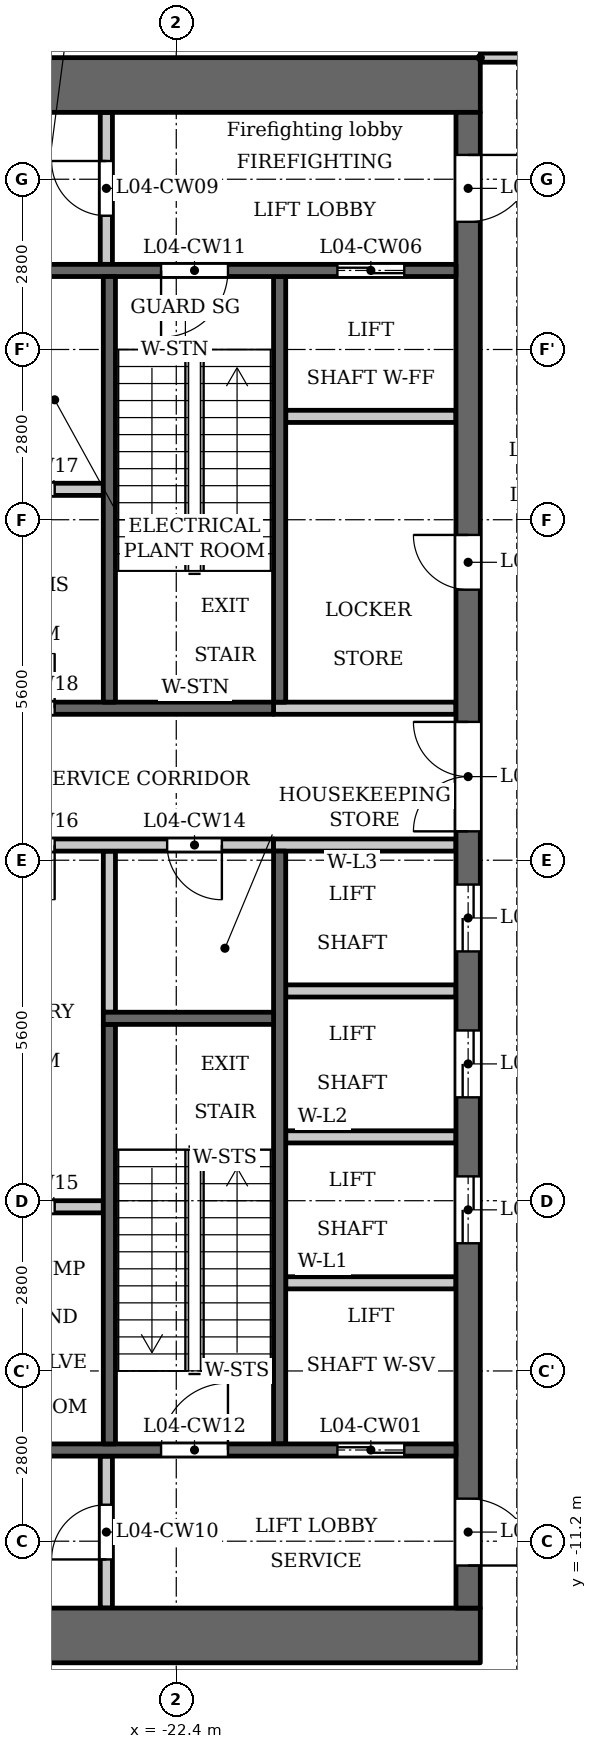
"""IFC4 building model, lengths in metres.
Left out: names, types, materials, properties, quantities, classifications, styles, units other than length and angle.
Written with IfcOpenShell. Run it as: python <this file> out.ifc"""

import sys

from ifc_helpers import new_model, si_unit, direction, frame, frame_2d, origin, place, context, subcontext, project, spatial, rectangle, extrude, element, fill, save


model = new_model("IFC4")
c1 = context("Model", 3, precision=1e-05, world=origin(), true_north=direction((0.0, 1.0)))
c2 = subcontext(c1, "Body", "Model", "MODEL_VIEW")
j1 = project(units=[si_unit("LENGTHUNIT", "METRE"), si_unit("PLANEANGLEUNIT", "RADIAN")], contexts=[c1])
p1 = place(None, origin())
s1 = spatial("IfcSite", under=j1, at=p1, CompositionType="ELEMENT")
p2 = place(p1, origin())
s2 = spatial("IfcBuilding", under=s1, at=p2, CompositionType="ELEMENT")
p3 = place(p2, frame((0.0, 0.0, 20.9)))
s3 = spatial("IfcBuildingStorey", under=s2, at=p3, CompositionType="ELEMENT", Elevation=20.9)
p4 = place(p3, frame((-23.5, -2.5, 0.0), z_axis=(0.0, 0.0, 1.0), x_axis=(0.0, 1.0, 0.0)))
e1 = element("IfcWall", 1, at=p4, inside=s3, PredefinedType="PARTITIONING", context=c2, shape_type="SweptSolid", body=[
    extrude(rectangle(XDim=2.65, YDim=0.2, at=frame_2d((1.325, 0.0))), origin(), (0.0, 0.0, 1.0), 4.45),
])
p5 = place(p3, frame((-20.7, 2.6, 0.0), z_axis=(0.0, 0.0, 1.0), x_axis=(0.0, 1.0, 0.0)))
e2 = element("IfcWall", 2, at=p5, inside=s3, PredefinedType="SHEAR", context=c2, shape_type="SweptSolid", body=[
    extrude(rectangle(XDim=7.0, YDim=0.2, at=frame_2d((3.5, 0.0))), origin(), (0.0, 0.0, 1.0), 4.45),
])
p6 = place(p3, frame((-20.7, -9.6, 0.0), z_axis=(0.0, 0.0, 1.0), x_axis=(0.0, 1.0, 0.0)))
e3 = element("IfcWall", 3, at=p6, inside=s3, PredefinedType="SHEAR", context=c2, shape_type="SweptSolid", body=[
    extrude(rectangle(XDim=9.75, YDim=0.2, at=frame_2d((4.875, 0.0))), origin(), (0.0, 0.0, 1.0), 4.45),
])
p7 = place(p3, frame((-20.8, 2.5, 0.0), z_axis=(0.0, 0.0, 1.0), x_axis=(-1.0, 0.0, 0.0)))
e4 = element("IfcWall", 4, at=p7, inside=s3, PredefinedType="SHEAR", context=c2, shape_type="SweptSolid", body=[
    extrude(rectangle(XDim=5.3, YDim=0.2, at=frame_2d((2.65, 0.0))), origin(), (0.0, 0.0, 1.0), 4.45),
])
p8 = place(p7, frame((3.6, 0.0, 0.0)))
e5 = element("IfcOpeningElement", 5, at=p8, cuts=e4, PredefinedType="OPENING", context=c2, shape_type="SweptSolid", body=[
    extrude(rectangle(XDim=0.9, YDim=2.1, at=frame_2d((0.45, 1.05))), frame((0.0, 0.11, 0.0), z_axis=(0.0, -1.0, 0.0), x_axis=(1.0, 0.0, 0.0)), (0.0, 0.0, 1.0), 0.22),
])
p9 = place(p3, frame((-20.8, 0.25, 0.0), z_axis=(0.0, 0.0, 1.0), x_axis=(-1.0, 0.0, 0.0)))
e6 = element("IfcWall", 6, at=p9, inside=s3, PredefinedType="PARTITIONING", context=c2, shape_type="SweptSolid", body=[
    extrude(rectangle(XDim=5.3, YDim=0.2, at=frame_2d((2.65, 0.0))), origin(), (0.0, 0.0, 1.0), 4.45),
])
p10 = place(p9, frame((0.85, 0.0, 0.0)))
e7 = element("IfcOpeningElement", 7, at=p10, cuts=e6, PredefinedType="OPENING", context=c2, shape_type="SweptSolid", body=[
    extrude(rectangle(XDim=0.9, YDim=2.1, at=frame_2d((0.45, 1.05))), frame((0.0, 0.11, 0.0), z_axis=(0.0, -1.0, 0.0), x_axis=(1.0, 0.0, 0.0)), (0.0, 0.0, 1.0), 0.22),
])
p11 = place(p9, frame((3.6, 0.0, 0.0)))
e8 = element("IfcOpeningElement", 8, at=p11, cuts=e6, PredefinedType="OPENING", context=c2, shape_type="SweptSolid", body=[
    extrude(rectangle(XDim=0.9, YDim=2.1, at=frame_2d((0.45, 1.05))), frame((0.0, 0.11, 0.0), z_axis=(0.0, -1.0, 0.0), x_axis=(1.0, 0.0, 0.0)), (0.0, 0.0, 1.0), 0.22),
])
for number, where, z_axis, x_axis in (
    (9, (-17.4, 12.75, 0.0), (0.0, 0.0, 1.0), (-1.0, 0.0, 0.0)),
    (10, (-17.4, -12.75, 0.0), (0.0, 0.0, 1.0), (-1.0, 0.0, 0.0)),
):
    element("IfcWall", number, at=place(p3, frame(where, z_axis=z_axis, x_axis=x_axis)), inside=s3, PredefinedType="SHEAR", context=c2, shape_type="SweptSolid", body=[
        extrude(rectangle(XDim=10.4, YDim=0.9, at=frame_2d((5.2, 0.0))), origin(), (0.0, 0.0, 1.0), 4.45),
    ])
p12 = place(p3, frame((-17.6, -12.3, 0.0), z_axis=(0.0, 0.0, 1.0), x_axis=(0.0, 1.0, 0.0)))
e11 = element("IfcWall", 11, at=p12, inside=s3, PredefinedType="SHEAR", context=c2, shape_type="SweptSolid", body=[
    extrude(rectangle(XDim=24.6, YDim=0.4, at=frame_2d((12.3, 0.0))), origin(), (0.0, 0.0, 1.0), 4.45),
])
p13 = place(p12, frame((6.0, 0.0, 0.0)))
e12 = element("IfcOpeningElement", 12, at=p13, cuts=e11, PredefinedType="OPENING", context=c2, shape_type="SweptSolid", body=[
    extrude(rectangle(XDim=1.1, YDim=2.1, at=frame_2d((0.55, 1.05))), frame((0.0, 0.21, 0.0), z_axis=(0.0, -1.0, 0.0), x_axis=(1.0, 0.0, 0.0)), (0.0, 0.0, 1.0), 0.42),
])
p14 = place(p12, frame((8.4, 0.0, 0.0)))
e13 = element("IfcOpeningElement", 13, at=p14, cuts=e11, PredefinedType="OPENING", context=c2, shape_type="SweptSolid", body=[
    extrude(rectangle(XDim=1.1, YDim=2.1, at=frame_2d((0.55, 1.05))), frame((0.0, 0.21, 0.0), z_axis=(0.0, -1.0, 0.0), x_axis=(1.0, 0.0, 0.0)), (0.0, 0.0, 1.0), 0.42),
])
p15 = place(p12, frame((10.8, 0.0, 0.0)))
e14 = element("IfcOpeningElement", 14, at=p15, cuts=e11, PredefinedType="OPENING", context=c2, shape_type="SweptSolid", body=[
    extrude(rectangle(XDim=1.1, YDim=2.1, at=frame_2d((0.55, 1.05))), frame((0.0, 0.21, 0.0), z_axis=(0.0, -1.0, 0.0), x_axis=(1.0, 0.0, 0.0)), (0.0, 0.0, 1.0), 0.42),
])
p16 = place(p12, frame((16.75, 0.0, 0.0)))
e15 = element("IfcOpeningElement", 15, at=p16, cuts=e11, PredefinedType="OPENING", context=c2, shape_type="SweptSolid", body=[
    extrude(rectangle(XDim=0.9, YDim=2.1, at=frame_2d((0.45, 1.05))), frame((0.0, 0.21, 0.0), z_axis=(0.0, -1.0, 0.0), x_axis=(1.0, 0.0, 0.0)), (0.0, 0.0, 1.0), 0.42),
])
p17 = place(p12, frame((22.8, 0.0, 0.0)))
e16 = element("IfcOpeningElement", 16, at=p17, cuts=e11, PredefinedType="OPENING", context=c2, shape_type="SweptSolid", body=[
    extrude(rectangle(XDim=1.1, YDim=2.1, at=frame_2d((0.55, 1.05))), frame((0.0, 0.21, 0.0), z_axis=(0.0, -1.0, 0.0), x_axis=(1.0, 0.0, 0.0)), (0.0, 0.0, 1.0), 0.42),
])
p18 = place(p12, frame((0.7, 0.0, 0.0)))
e17 = element("IfcOpeningElement", 17, at=p18, cuts=e11, PredefinedType="OPENING", context=c2, shape_type="SweptSolid", body=[
    extrude(rectangle(XDim=1.1, YDim=2.1, at=frame_2d((0.55, 1.05))), frame((0.0, 0.21, 0.0), z_axis=(0.0, -1.0, 0.0), x_axis=(1.0, 0.0, 0.0)), (0.0, 0.0, 1.0), 0.42),
])
p19 = place(p12, frame((12.775, 0.0, 0.0)))
e18 = element("IfcOpeningElement", 18, at=p19, cuts=e11, PredefinedType="OPENING", context=c2, shape_type="SweptSolid", body=[
    extrude(rectangle(XDim=1.8, YDim=2.1, at=frame_2d((0.9, 1.05))), frame((0.0, 0.21, 0.0), z_axis=(0.0, -1.0, 0.0), x_axis=(1.0, 0.0, 0.0)), (0.0, 0.0, 1.0), 0.42),
])
p20 = place(p3, frame((-23.55, 9.8, 0.0), z_axis=(0.0, 0.0, 1.0), x_axis=(0.0, 1.0, 0.0)))
e19 = element("IfcWall", 19, at=p20, inside=s3, PredefinedType="PARTITIONING", context=c2, shape_type="SweptSolid", body=[
    extrude(rectangle(XDim=2.5, YDim=0.2, at=frame_2d((1.25, 0.0))), origin(), (0.0, 0.0, 1.0), 4.45),
])
p21 = place(p20, frame((0.8, 0.0, 0.0)))
e20 = element("IfcOpeningElement", 20, at=p21, cuts=e19, PredefinedType="OPENING", context=c2, shape_type="SweptSolid", body=[
    extrude(rectangle(XDim=0.9, YDim=2.1, at=frame_2d((0.45, 1.05))), frame((0.0, 0.11, 0.0), z_axis=(0.0, -1.0, 0.0), x_axis=(1.0, 0.0, 0.0)), (0.0, 0.0, 1.0), 0.22),
])
p22 = place(p3, frame((-23.55, -12.3, 0.0), z_axis=(0.0, 0.0, 1.0), x_axis=(0.0, 1.0, 0.0)))
e21 = element("IfcWall", 21, at=p22, inside=s3, PredefinedType="PARTITIONING", context=c2, shape_type="SweptSolid", body=[
    extrude(rectangle(XDim=2.5, YDim=0.2, at=frame_2d((1.25, 0.0))), origin(), (0.0, 0.0, 1.0), 4.45),
])
p23 = place(p22, frame((0.8, 0.0, 0.0)))
e22 = element("IfcOpeningElement", 22, at=p23, cuts=e21, PredefinedType="OPENING", context=c2, shape_type="SweptSolid", body=[
    extrude(rectangle(XDim=0.9, YDim=2.1, at=frame_2d((0.45, 1.05))), frame((0.0, 0.11, 0.0), z_axis=(0.0, -1.0, 0.0), x_axis=(1.0, 0.0, 0.0)), (0.0, 0.0, 1.0), 0.22),
])
p24 = place(p3, frame((-23.6, -5.7, 0.0), z_axis=(0.0, 0.0, 1.0), x_axis=(-1.0, 0.0, 0.0)))
e23 = element("IfcWall", 23, at=p24, inside=s3, PredefinedType="PARTITIONING", context=c2, shape_type="SweptSolid", body=[
    extrude(rectangle(XDim=2.5, YDim=0.2, at=frame_2d((1.25, 0.0))), origin(), (0.0, 0.0, 1.0), 4.45),
])
p25 = place(p24, frame((0.8, 0.0, 0.0)))
e24 = element("IfcOpeningElement", 24, at=p25, cuts=e23, PredefinedType="OPENING", context=c2, shape_type="SweptSolid", body=[
    extrude(rectangle(XDim=0.9, YDim=2.1, at=frame_2d((0.45, 1.05))), frame((0.0, 0.11, 0.0), z_axis=(0.0, -1.0, 0.0), x_axis=(1.0, 0.0, 0.0)), (0.0, 0.0, 1.0), 0.22),
])
p26 = place(p3, frame((-23.6, 6.1, 0.0), z_axis=(0.0, 0.0, 1.0), x_axis=(-1.0, 0.0, 0.0)))
e25 = element("IfcWall", 25, at=p26, inside=s3, PredefinedType="PARTITIONING", context=c2, shape_type="SweptSolid", body=[
    extrude(rectangle(XDim=2.5, YDim=0.2, at=frame_2d((1.25, 0.0))), origin(), (0.0, 0.0, 1.0), 4.45),
])
p27 = place(p26, frame((0.8, 0.0, 0.0)))
e26 = element("IfcOpeningElement", 26, at=p27, cuts=e25, PredefinedType="OPENING", context=c2, shape_type="SweptSolid", body=[
    extrude(rectangle(XDim=0.9, YDim=2.1, at=frame_2d((0.45, 1.05))), frame((0.0, 0.11, 0.0), z_axis=(0.0, -1.0, 0.0), x_axis=(1.0, 0.0, 0.0)), (0.0, 0.0, 1.0), 0.22),
])
p28 = place(p3, frame((-17.8, -9.7, 0.0), z_axis=(0.0, 0.0, 1.0), x_axis=(-1.0, 0.0, 0.0)))
e27 = element("IfcWall", 27, at=p28, inside=s3, PredefinedType="SHEAR", context=c2, shape_type="SweptSolid", body=[
    extrude(rectangle(XDim=8.3, YDim=0.2, at=frame_2d((4.15, 0.0))), origin(), (0.0, 0.0, 1.0), 4.45),
])
p29 = place(p28, frame((0.85, 0.0, 0.0)))
e28 = element("IfcOpeningElement", 28, at=p29, cuts=e27, PredefinedType="OPENING", context=c2, shape_type="SweptSolid", body=[
    extrude(rectangle(XDim=1.1, YDim=2.1, at=frame_2d((0.55, 1.05))), frame((0.0, 0.11, 0.0), z_axis=(0.0, -1.0, 0.0), x_axis=(1.0, 0.0, 0.0)), (0.0, 0.0, 1.0), 0.22),
])
p30 = place(p28, frame((3.75, 0.0, 0.0)))
e29 = element("IfcOpeningElement", 29, at=p30, cuts=e27, PredefinedType="OPENING", context=c2, shape_type="SweptSolid", body=[
    extrude(rectangle(XDim=1.1, YDim=2.1, at=frame_2d((0.55, 1.05))), frame((0.0, 0.11, 0.0), z_axis=(0.0, -1.0, 0.0), x_axis=(1.0, 0.0, 0.0)), (0.0, 0.0, 1.0), 0.22),
])
for number, where, z_axis, x_axis in (
    (30, (-17.8, -6.95, 0.0), (0.0, 0.0, 1.0), (-1.0, 0.0, 0.0)),
    (31, (-17.8, -4.55, 0.0), (0.0, 0.0, 1.0), (-1.0, 0.0, 0.0)),
    (32, (-17.8, -2.15, 0.0), (0.0, 0.0, 1.0), (-1.0, 0.0, 0.0)),
):
    element("IfcWall", number, at=place(p3, frame(where, z_axis=z_axis, x_axis=x_axis)), inside=s3, PredefinedType="PARTITIONING", context=c2, shape_type="SweptSolid", body=[
        extrude(rectangle(XDim=2.8, YDim=0.2, at=frame_2d((1.4, 0.0))), origin(), (0.0, 0.0, 1.0), 4.45),
    ])
for number, where, z_axis, x_axis in (
    (33, (-17.8, 0.25, 0.0), (0.0, 0.0, 1.0), (-1.0, 0.0, 0.0)),
    (34, (-17.8, 2.5, 0.0), (0.0, 0.0, 1.0), (-1.0, 0.0, 0.0)),
):
    element("IfcWall", number, at=place(p3, frame(where, z_axis=z_axis, x_axis=x_axis)), inside=s3, PredefinedType="PARTITIONING", context=c2, shape_type="SweptSolid", body=[
        extrude(rectangle(XDim=3.0, YDim=0.2, at=frame_2d((1.5, 0.0))), origin(), (0.0, 0.0, 1.0), 4.45),
    ])
p31 = place(p3, frame((-17.8, 7.3, 0.0), z_axis=(0.0, 0.0, 1.0), x_axis=(-1.0, 0.0, 0.0)))
e35 = element("IfcWall", 35, at=p31, inside=s3, PredefinedType="PARTITIONING", context=c2, shape_type="SweptSolid", body=[
    extrude(rectangle(XDim=2.8, YDim=0.2, at=frame_2d((1.4, 0.0))), origin(), (0.0, 0.0, 1.0), 4.45),
])
p32 = place(p3, frame((-17.8, 9.7, 0.0), z_axis=(0.0, 0.0, 1.0), x_axis=(-1.0, 0.0, 0.0)))
e36 = element("IfcWall", 36, at=p32, inside=s3, PredefinedType="SHEAR", context=c2, shape_type="SweptSolid", body=[
    extrude(rectangle(XDim=8.3, YDim=0.2, at=frame_2d((4.15, 0.0))), origin(), (0.0, 0.0, 1.0), 4.45),
])
p33 = place(p32, frame((0.85, 0.0, 0.0)))
e37 = element("IfcOpeningElement", 37, at=p33, cuts=e36, PredefinedType="OPENING", context=c2, shape_type="SweptSolid", body=[
    extrude(rectangle(XDim=1.1, YDim=2.1, at=frame_2d((0.55, 1.05))), frame((0.0, 0.11, 0.0), z_axis=(0.0, -1.0, 0.0), x_axis=(1.0, 0.0, 0.0)), (0.0, 0.0, 1.0), 0.22),
])
p34 = place(p32, frame((3.75, 0.0, 0.0)))
e38 = element("IfcOpeningElement", 38, at=p34, cuts=e36, PredefinedType="OPENING", context=c2, shape_type="SweptSolid", body=[
    extrude(rectangle(XDim=1.1, YDim=2.1, at=frame_2d((0.55, 1.05))), frame((0.0, 0.11, 0.0), z_axis=(0.0, -1.0, 0.0), x_axis=(1.0, 0.0, 0.0)), (0.0, 0.0, 1.0), 0.22),
])
p35 = place(p3, frame((-23.5, 2.6, 0.0), z_axis=(0.0, 0.0, 1.0), x_axis=(0.0, 1.0, 0.0)))
e39 = element("IfcWall", 39, at=p35, inside=s3, PredefinedType="SHEAR", context=c2, shape_type="SweptSolid", body=[
    extrude(rectangle(XDim=7.0, YDim=0.2, at=frame_2d((3.5, 0.0))), origin(), (0.0, 0.0, 1.0), 4.45),
])
p36 = place(p3, frame((-23.5, -9.6, 0.0), z_axis=(0.0, 0.0, 1.0), x_axis=(0.0, 1.0, 0.0)))
e40 = element("IfcWall", 40, at=p36, inside=s3, PredefinedType="SHEAR", context=c2, shape_type="SweptSolid", body=[
    extrude(rectangle(XDim=6.9, YDim=0.2, at=frame_2d((3.45, 0.0))), origin(), (0.0, 0.0, 1.0), 4.45),
])
p37 = place(p3, frame((-20.8, -2.6, 0.0), z_axis=(0.0, 0.0, 1.0), x_axis=(-1.0, 0.0, 0.0)))
e41 = element("IfcWall", 41, at=p37, inside=s3, PredefinedType="SHEAR", context=c2, shape_type="SweptSolid", body=[
    extrude(rectangle(XDim=2.8, YDim=0.2, at=frame_2d((1.4, 0.0))), origin(), (0.0, 0.0, 1.0), 4.45),
])
p38 = place(p3, frame((-17.4, 13.2, 0.0), z_axis=(0.0, 0.0, 1.0), x_axis=(1.0, 0.0, 0.0)))
e42 = element("IfcWall", 42, at=p38, inside=s3, PredefinedType="PARTITIONING", context=c2, shape_type="SweptSolid", body=[
    extrude(rectangle(XDim=34.8, YDim=0.15, at=frame_2d((17.4, 0.0))), origin(), (0.0, 0.0, 1.0), 4.45),
])
p39 = place(p38, frame((3.05, 0.0, 0.0)))
e43 = element("IfcOpeningElement", 43, at=p39, cuts=e42, PredefinedType="OPENING", context=c2, shape_type="SweptSolid", body=[
    extrude(rectangle(XDim=1.8, YDim=2.1, at=frame_2d((0.9, 1.05))), frame((0.0, 0.085, 0.0), z_axis=(0.0, -1.0, 0.0), x_axis=(1.0, 0.0, 0.0)), (0.0, 0.0, 1.0), 0.17),
])
p40 = place(p38, frame((0.75, 0.0, 0.0)))
e44 = element("IfcOpeningElement", 44, at=p40, cuts=e42, PredefinedType="OPENING", context=c2, shape_type="SweptSolid", body=[
    extrude(rectangle(XDim=1.0, YDim=2.1, at=frame_2d((0.5, 1.05))), frame((0.0, 0.085, 0.0), z_axis=(0.0, -1.0, 0.0), x_axis=(1.0, 0.0, 0.0)), (0.0, 0.0, 1.0), 0.17),
])
p41 = place(p38, frame((33.15, 0.0, 0.0)))
e45 = element("IfcOpeningElement", 45, at=p41, cuts=e42, PredefinedType="OPENING", context=c2, shape_type="SweptSolid", body=[
    extrude(rectangle(XDim=1.0, YDim=2.1, at=frame_2d((0.5, 1.05))), frame((0.0, 0.085, 0.0), z_axis=(0.0, -1.0, 0.0), x_axis=(1.0, 0.0, 0.0)), (0.0, 0.0, 1.0), 0.17),
])
p42 = place(p29, origin())
e46 = element("IfcDoor", 46, at=p42, inside=s3, OperationType="DOUBLE_DOOR_SLIDING", PredefinedType="DOOR", context=c2, shape_type="SweptSolid", body=[
    extrude(rectangle(XDim=1.1, YDim=2.1, at=frame_2d((0.55, 1.05))), frame((0.0, 0.025, 0.0), z_axis=(0.0, -1.0, 0.0), x_axis=(1.0, 0.0, 0.0)), (0.0, 0.0, 1.0), 0.05),
])
fill(e28, e46)
p43 = place(p13, origin())
e47 = element("IfcDoor", 47, at=p43, inside=s3, OperationType="DOUBLE_DOOR_SLIDING", PredefinedType="DOOR", context=c2, shape_type="SweptSolid", body=[
    extrude(rectangle(XDim=1.1, YDim=2.1, at=frame_2d((0.55, 1.05))), frame((0.0, 0.025, 0.0), z_axis=(0.0, -1.0, 0.0), x_axis=(1.0, 0.0, 0.0)), (0.0, 0.0, 1.0), 0.05),
])
fill(e12, e47)
p44 = place(p14, origin())
e48 = element("IfcDoor", 48, at=p44, inside=s3, OperationType="DOUBLE_DOOR_SLIDING", PredefinedType="DOOR", context=c2, shape_type="SweptSolid", body=[
    extrude(rectangle(XDim=1.1, YDim=2.1, at=frame_2d((0.55, 1.05))), frame((0.0, 0.025, 0.0), z_axis=(0.0, -1.0, 0.0), x_axis=(1.0, 0.0, 0.0)), (0.0, 0.0, 1.0), 0.05),
])
fill(e13, e48)
p45 = place(p15, origin())
e49 = element("IfcDoor", 49, at=p45, inside=s3, OperationType="DOUBLE_DOOR_SLIDING", PredefinedType="DOOR", context=c2, shape_type="SweptSolid", body=[
    extrude(rectangle(XDim=1.1, YDim=2.1, at=frame_2d((0.55, 1.05))), frame((0.0, 0.025, 0.0), z_axis=(0.0, -1.0, 0.0), x_axis=(1.0, 0.0, 0.0)), (0.0, 0.0, 1.0), 0.05),
])
fill(e14, e49)
p46 = place(p16, origin())
e50 = element("IfcDoor", 50, at=p46, inside=s3, OperationType="SINGLE_SWING_LEFT", PredefinedType="DOOR", context=c2, shape_type="SweptSolid", body=[
    extrude(rectangle(XDim=0.9, YDim=2.1, at=frame_2d((0.45, 1.05))), frame((0.0, 0.025, 0.0), z_axis=(0.0, -1.0, 0.0), x_axis=(1.0, 0.0, 0.0)), (0.0, 0.0, 1.0), 0.05),
])
fill(e15, e50)
p47 = place(p33, origin())
e51 = element("IfcDoor", 51, at=p47, inside=s3, OperationType="DOUBLE_DOOR_SLIDING", PredefinedType="DOOR", context=c2, shape_type="SweptSolid", body=[
    extrude(rectangle(XDim=1.1, YDim=2.1, at=frame_2d((0.55, 1.05))), frame((0.0, 0.025, 0.0), z_axis=(0.0, -1.0, 0.0), x_axis=(1.0, 0.0, 0.0)), (0.0, 0.0, 1.0), 0.05),
])
fill(e37, e51)
p48 = place(p17, origin())
e52 = element("IfcDoor", 52, at=p48, inside=s3, OperationType="SINGLE_SWING_RIGHT", PredefinedType="DOOR", context=c2, shape_type="SweptSolid", body=[
    extrude(rectangle(XDim=1.1, YDim=2.1, at=frame_2d((0.55, 1.05))), frame((0.0, 0.025, 0.0), z_axis=(0.0, -1.0, 0.0), x_axis=(1.0, 0.0, 0.0)), (0.0, 0.0, 1.0), 0.05),
])
fill(e16, e52)
p49 = place(p18, origin())
e53 = element("IfcDoor", 53, at=p49, inside=s3, OperationType="SINGLE_SWING_LEFT", PredefinedType="DOOR", context=c2, shape_type="SweptSolid", body=[
    extrude(rectangle(XDim=1.1, YDim=2.1, at=frame_2d((0.55, 1.05))), frame((0.0, 0.025, 0.0), z_axis=(0.0, -1.0, 0.0), x_axis=(1.0, 0.0, 0.0)), (0.0, 0.0, 1.0), 0.05),
])
fill(e17, e53)
p50 = place(p21, origin())
e54 = element("IfcDoor", 54, at=p50, inside=s3, OperationType="SINGLE_SWING_LEFT", PredefinedType="DOOR", context=c2, shape_type="SweptSolid", body=[
    extrude(rectangle(XDim=0.9, YDim=2.1, at=frame_2d((0.45, 1.05))), frame((0.0, 0.025, 0.0), z_axis=(0.0, -1.0, 0.0), x_axis=(1.0, 0.0, 0.0)), (0.0, 0.0, 1.0), 0.05),
])
fill(e20, e54)
p51 = place(p23, origin())
e55 = element("IfcDoor", 55, at=p51, inside=s3, OperationType="SINGLE_SWING_RIGHT", PredefinedType="DOOR", context=c2, shape_type="SweptSolid", body=[
    extrude(rectangle(XDim=0.9, YDim=2.1, at=frame_2d((0.45, 1.05))), frame((0.0, 0.025, 0.0), z_axis=(0.0, -1.0, 0.0), x_axis=(1.0, 0.0, 0.0)), (0.0, 0.0, 1.0), 0.05),
])
fill(e22, e55)
p52 = place(p34, origin())
e56 = element("IfcDoor", 56, at=p52, inside=s3, OperationType="SINGLE_SWING_LEFT", PredefinedType="DOOR", context=c2, shape_type="SweptSolid", body=[
    extrude(rectangle(XDim=1.1, YDim=2.1, at=frame_2d((0.55, 1.05))), frame((0.0, 0.025, 0.0), z_axis=(0.0, -1.0, 0.0), x_axis=(1.0, 0.0, 0.0)), (0.0, 0.0, 1.0), 0.05),
])
fill(e38, e56)
p53 = place(p30, origin())
e57 = element("IfcDoor", 57, at=p53, inside=s3, OperationType="SINGLE_SWING_LEFT", PredefinedType="DOOR", context=c2, shape_type="SweptSolid", body=[
    extrude(rectangle(XDim=1.1, YDim=2.1, at=frame_2d((0.55, 1.05))), frame((0.0, 0.025, 0.0), z_axis=(0.0, -1.0, 0.0), x_axis=(1.0, 0.0, 0.0)), (0.0, 0.0, 1.0), 0.05),
])
fill(e29, e57)
p54 = place(p19, origin())
e58 = element("IfcDoor", 58, at=p54, inside=s3, OperationType="DOUBLE_DOOR_SINGLE_SWING", PredefinedType="DOOR", context=c2, shape_type="SweptSolid", body=[
    extrude(rectangle(XDim=1.8, YDim=2.1, at=frame_2d((0.9, 1.05))), frame((0.0, 0.025, 0.0), z_axis=(0.0, -1.0, 0.0), x_axis=(1.0, 0.0, 0.0)), (0.0, 0.0, 1.0), 0.05),
])
fill(e18, e58)
p55 = place(p10, origin())
e59 = element("IfcDoor", 59, at=p55, inside=s3, OperationType="SINGLE_SWING_RIGHT", PredefinedType="DOOR", context=c2, shape_type="SweptSolid", body=[
    extrude(rectangle(XDim=0.9, YDim=2.1, at=frame_2d((0.45, 1.05))), frame((0.0, 0.025, 0.0), z_axis=(0.0, -1.0, 0.0), x_axis=(1.0, 0.0, 0.0)), (0.0, 0.0, 1.0), 0.05),
])
fill(e7, e59)
p56 = place(p25, origin())
e60 = element("IfcDoor", 60, at=p56, inside=s3, OperationType="SINGLE_SWING_RIGHT", PredefinedType="DOOR", context=c2, shape_type="SweptSolid", body=[
    extrude(rectangle(XDim=0.9, YDim=2.1, at=frame_2d((0.45, 1.05))), frame((0.0, 0.025, 0.0), z_axis=(0.0, -1.0, 0.0), x_axis=(1.0, 0.0, 0.0)), (0.0, 0.0, 1.0), 0.05),
])
fill(e24, e60)
p57 = place(p11, origin())
e61 = element("IfcDoor", 61, at=p57, inside=s3, OperationType="SINGLE_SWING_RIGHT", PredefinedType="DOOR", context=c2, shape_type="SweptSolid", body=[
    extrude(rectangle(XDim=0.9, YDim=2.1, at=frame_2d((0.45, 1.05))), frame((0.0, 0.025, 0.0), z_axis=(0.0, -1.0, 0.0), x_axis=(1.0, 0.0, 0.0)), (0.0, 0.0, 1.0), 0.05),
])
fill(e8, e61)
p58 = place(p27, origin())
e62 = element("IfcDoor", 62, at=p58, inside=s3, OperationType="SINGLE_SWING_RIGHT", PredefinedType="DOOR", context=c2, shape_type="SweptSolid", body=[
    extrude(rectangle(XDim=0.9, YDim=2.1, at=frame_2d((0.45, 1.05))), frame((0.0, 0.025, 0.0), z_axis=(0.0, -1.0, 0.0), x_axis=(1.0, 0.0, 0.0)), (0.0, 0.0, 1.0), 0.05),
])
fill(e26, e62)
p59 = place(p8, origin())
e63 = element("IfcDoor", 63, at=p59, inside=s3, OperationType="SINGLE_SWING_LEFT", PredefinedType="DOOR", context=c2, shape_type="SweptSolid", body=[
    extrude(rectangle(XDim=0.9, YDim=2.1, at=frame_2d((0.45, 1.05))), frame((0.0, 0.025, 0.0), z_axis=(0.0, -1.0, 0.0), x_axis=(1.0, 0.0, 0.0)), (0.0, 0.0, 1.0), 0.05),
])
fill(e5, e63)
save(model, sys.argv[1])
